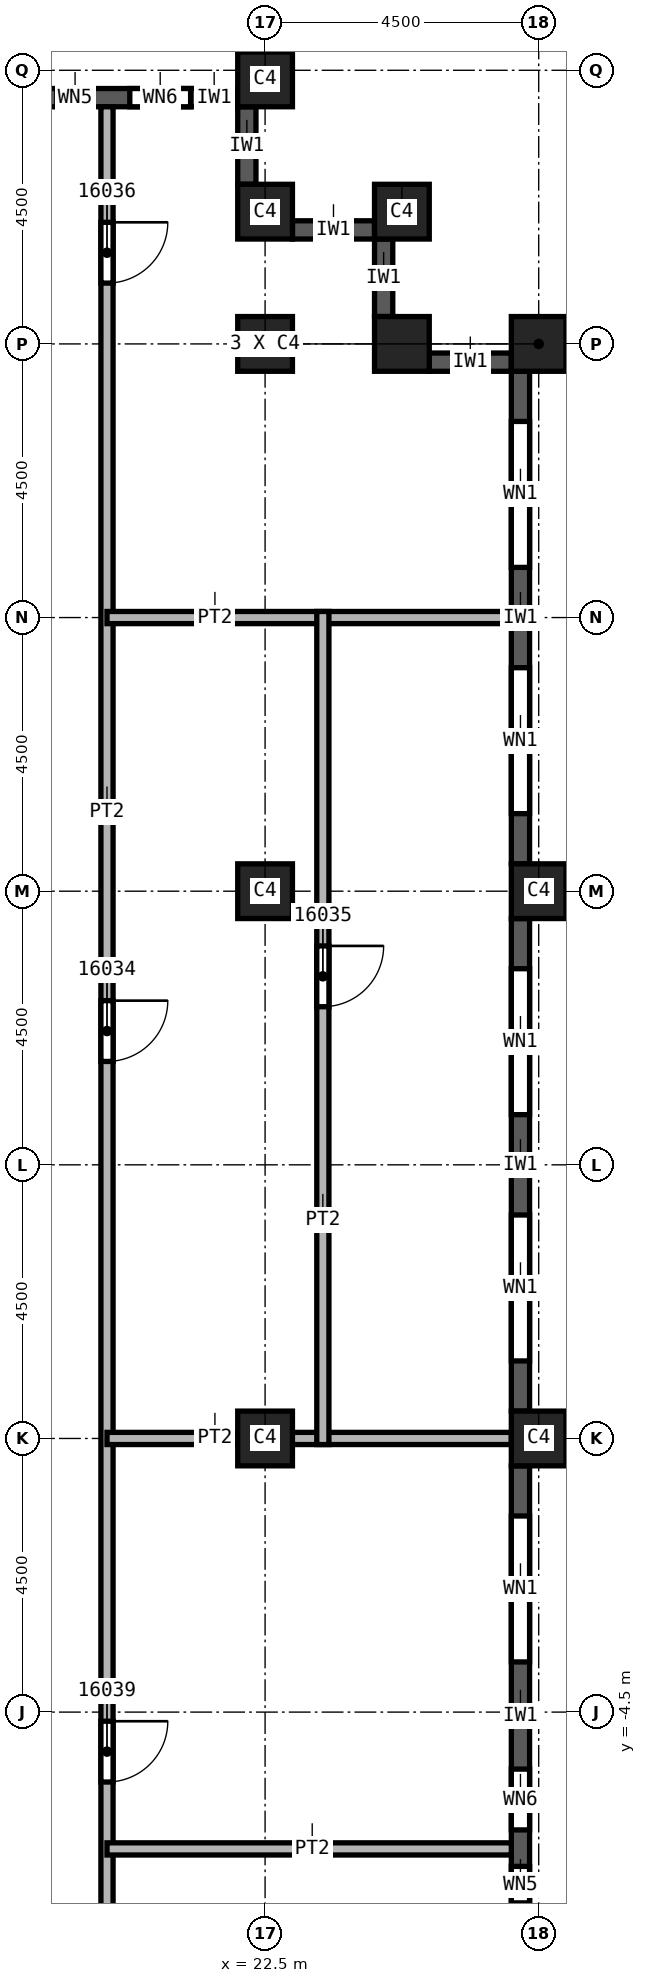
"""IFC4 building model, lengths in metres.
Left out: names, types, materials, properties, quantities, classifications, styles, units other than length and angle.
Written with IfcOpenShell. Run it as: python <this file> out.ifc"""

import sys

from ifc_helpers import new_model, si_unit, direction, frame, frame_2d, origin, origin_2d, place, context, subcontext, project, spatial, rectangle, extrude, element, fill, save


model = new_model("IFC4")
c1 = context("Model", 3, precision=1e-05, world=origin(), true_north=direction((0.0, 1.0)))
c2 = subcontext(c1, "Body", "Model", "MODEL_VIEW")
j1 = project(units=[si_unit("LENGTHUNIT", "METRE"), si_unit("PLANEANGLEUNIT", "RADIAN")], contexts=[c1])
p1 = place(None, origin())
s1 = spatial("IfcSite", under=j1, at=p1, CompositionType="ELEMENT")
p2 = place(p1, origin())
s2 = spatial("IfcBuilding", under=s1, at=p2, CompositionType="ELEMENT")
p3 = place(p2, frame((0.0, 0.0, 246.0)))
s3 = spatial("IfcBuildingStorey", under=s2, at=p3, CompositionType="ELEMENT", Elevation=246.0)
for number, where, z_axis, x_axis in (
    (1, (22.5, 0.0, 0.0), (0.0, 0.0, 1.0), (1.0, 0.0, 0.0)),
    (2, (22.5, 9.0, 0.0), (0.0, 0.0, 1.0), (1.0, 0.0, 0.0)),
    (3, (22.5, 18.0, 0.0), (0.0, 0.0, 1.0), (1.0, 0.0, 0.0)),
    (4, (27.0, 0.0, 0.0), (0.0, 0.0, 1.0), (0.0, 1.0, 0.0)),
    (5, (27.0, 9.0, 0.0), (0.0, 0.0, 1.0), (0.0, 1.0, 0.0)),
    (6, (27.0, 18.0, 0.0), (0.0, 0.0, 1.0), (0.0, 1.0, 0.0)),
    (7, (22.5, 22.35, 0.0), (0.0, 0.0, 1.0), (1.0, 0.0, 0.0)),
    (8, (22.5, 20.175, 0.0), (0.0, 0.0, 1.0), (1.0, 0.0, 0.0)),
    (9, (24.75, 20.175, 0.0), (0.0, 0.0, 1.0), (1.0, 0.0, 0.0)),
    (10, (24.75, 18.0, 0.0), (0.0, 0.0, 1.0), (1.0, 0.0, 0.0)),
):
    element("IfcColumn", number, at=place(p3, frame(where, z_axis=z_axis, x_axis=x_axis)), inside=s3, PredefinedType="COLUMN", context=c2, shape_type="SweptSolid", body=[
        extrude(rectangle(XDim=0.9, YDim=0.9, at=origin_2d()), origin(), (0.0, 0.0, 1.0), 3.72),
    ])
p4 = place(p3, frame((26.7, -8.55, 0.0), z_axis=(0.0, 0.0, 1.0), x_axis=(0.0, 1.0, 0.0)))
e11 = element("IfcWall", 11, at=p4, inside=s3, PredefinedType="SOLIDWALL", context=c2, shape_type="SweptSolid", body=[
    extrude(rectangle(XDim=8.1, YDim=0.3, at=frame_2d((4.05, 0.0))), origin(), (0.0, 0.0, 1.0), 3.12),
])
p5 = place(p4, frame((4.875, 0.0, 0.8)))
e12 = element("IfcOpeningElement", 12, at=p5, cuts=e11, PredefinedType="OPENING", context=c2, shape_type="SweptSolid", body=[
    extrude(rectangle(XDim=2.4, YDim=1.95, at=frame_2d((1.2, 0.975))), frame((0.0, 0.15, 0.0), z_axis=(0.0, -1.0, 0.0), x_axis=(1.0, 0.0, 0.0)), (0.0, 0.0, 1.0), 0.3),
])
p6 = place(p4, frame((0.913, 0.0, 0.8)))
e13 = element("IfcOpeningElement", 13, at=p6, cuts=e11, PredefinedType="OPENING", context=c2, shape_type="SweptSolid", body=[
    extrude(rectangle(XDim=0.6, YDim=1.95, at=frame_2d((0.3, 0.975))), frame((0.0, 0.15, 0.0), z_axis=(0.0, -1.0, 0.0), x_axis=(1.0, 0.0, 0.0)), (0.0, 0.0, 1.0), 0.3),
])
p7 = place(p4, frame((2.113, 0.0, 0.8)))
e14 = element("IfcOpeningElement", 14, at=p7, cuts=e11, PredefinedType="OPENING", context=c2, shape_type="SweptSolid", body=[
    extrude(rectangle(XDim=1.0, YDim=1.95, at=frame_2d((0.5, 0.975))), frame((0.0, 0.15, 0.0), z_axis=(0.0, -1.0, 0.0), x_axis=(1.0, 0.0, 0.0)), (0.0, 0.0, 1.0), 0.3),
])
p8 = place(p3, frame((26.7, 0.45, 0.0), z_axis=(0.0, 0.0, 1.0), x_axis=(0.0, 1.0, 0.0)))
e15 = element("IfcWall", 15, at=p8, inside=s3, PredefinedType="SOLIDWALL", context=c2, shape_type="SweptSolid", body=[
    extrude(rectangle(XDim=8.1, YDim=0.3, at=frame_2d((4.05, 0.0))), origin(), (0.0, 0.0, 1.0), 3.12),
])
p9 = place(p8, frame((0.825, 0.0, 0.8)))
e16 = element("IfcOpeningElement", 16, at=p9, cuts=e15, PredefinedType="OPENING", context=c2, shape_type="SweptSolid", body=[
    extrude(rectangle(XDim=2.4, YDim=1.95, at=frame_2d((1.2, 0.975))), frame((0.0, 0.15, 0.0), z_axis=(0.0, -1.0, 0.0), x_axis=(1.0, 0.0, 0.0)), (0.0, 0.0, 1.0), 0.3),
])
p10 = place(p8, frame((4.875, 0.0, 0.8)))
e17 = element("IfcOpeningElement", 17, at=p10, cuts=e15, PredefinedType="OPENING", context=c2, shape_type="SweptSolid", body=[
    extrude(rectangle(XDim=2.4, YDim=1.95, at=frame_2d((1.2, 0.975))), frame((0.0, 0.15, 0.0), z_axis=(0.0, -1.0, 0.0), x_axis=(1.0, 0.0, 0.0)), (0.0, 0.0, 1.0), 0.3),
])
p11 = place(p3, frame((26.7, 9.45, 0.0), z_axis=(0.0, 0.0, 1.0), x_axis=(0.0, 1.0, 0.0)))
e18 = element("IfcWall", 18, at=p11, inside=s3, PredefinedType="SOLIDWALL", context=c2, shape_type="SweptSolid", body=[
    extrude(rectangle(XDim=8.1, YDim=0.3, at=frame_2d((4.05, 0.0))), origin(), (0.0, 0.0, 1.0), 3.12),
])
p12 = place(p11, frame((0.825, 0.0, 0.8)))
e19 = element("IfcOpeningElement", 19, at=p12, cuts=e18, PredefinedType="OPENING", context=c2, shape_type="SweptSolid", body=[
    extrude(rectangle(XDim=2.4, YDim=1.95, at=frame_2d((1.2, 0.975))), frame((0.0, 0.15, 0.0), z_axis=(0.0, -1.0, 0.0), x_axis=(1.0, 0.0, 0.0)), (0.0, 0.0, 1.0), 0.3),
])
p13 = place(p11, frame((4.875, 0.0, 0.8)))
e20 = element("IfcOpeningElement", 20, at=p13, cuts=e18, PredefinedType="OPENING", context=c2, shape_type="SweptSolid", body=[
    extrude(rectangle(XDim=2.4, YDim=1.95, at=frame_2d((1.2, 0.975))), frame((0.0, 0.15, 0.0), z_axis=(0.0, -1.0, 0.0), x_axis=(1.0, 0.0, 0.0)), (0.0, 0.0, 1.0), 0.3),
])
p14 = place(p3, frame((26.55, 17.7, 0.0), z_axis=(0.0, 0.0, 1.0), x_axis=(-1.0, 0.0, 0.0)))
e21 = element("IfcWall", 21, at=p14, inside=s3, PredefinedType="SOLIDWALL", context=c2, shape_type="SweptSolid", body=[
    extrude(rectangle(XDim=1.35, YDim=0.3, at=frame_2d((0.675, 0.0))), origin(), (0.0, 0.0, 1.0), 3.12),
])
p15 = place(p3, frame((24.45, 18.45, 0.0), z_axis=(0.0, 0.0, 1.0), x_axis=(0.0, 1.0, 0.0)))
e22 = element("IfcWall", 22, at=p15, inside=s3, PredefinedType="SOLIDWALL", context=c2, shape_type="SweptSolid", body=[
    extrude(rectangle(XDim=1.275, YDim=0.3, at=frame_2d((0.638, 0.0))), origin(), (0.0, 0.0, 1.0), 3.12),
])
p16 = place(p3, frame((24.3, 19.875, 0.0), z_axis=(0.0, 0.0, 1.0), x_axis=(-1.0, 0.0, 0.0)))
e23 = element("IfcWall", 23, at=p16, inside=s3, PredefinedType="SOLIDWALL", context=c2, shape_type="SweptSolid", body=[
    extrude(rectangle(XDim=1.35, YDim=0.3, at=frame_2d((0.675, 0.0))), origin(), (0.0, 0.0, 1.0), 3.12),
])
p17 = place(p3, frame((22.2, 20.625, 0.0), z_axis=(0.0, 0.0, 1.0), x_axis=(0.0, 1.0, 0.0)))
e24 = element("IfcWall", 24, at=p17, inside=s3, PredefinedType="SOLIDWALL", context=c2, shape_type="SweptSolid", body=[
    extrude(rectangle(XDim=1.275, YDim=0.3, at=frame_2d((0.637, 0.0))), origin(), (0.0, 0.0, 1.0), 3.12),
])
p18 = place(p3, frame((22.05, 22.05, 0.0), z_axis=(0.0, 0.0, 1.0), x_axis=(-1.0, 0.0, 0.0)))
e25 = element("IfcWall", 25, at=p18, inside=s3, PredefinedType="SOLIDWALL", context=c2, shape_type="SweptSolid", body=[
    extrude(rectangle(XDim=3.6, YDim=0.3, at=frame_2d((1.8, 0.0))), origin(), (0.0, 0.0, 1.0), 3.12),
])
p19 = place(p18, frame((0.775, 0.0, 0.8)))
e26 = element("IfcOpeningElement", 26, at=p19, cuts=e25, PredefinedType="OPENING", context=c2, shape_type="SweptSolid", body=[
    extrude(rectangle(XDim=1.0, YDim=1.95, at=frame_2d((0.5, 0.975))), frame((0.0, 0.15, 0.0), z_axis=(0.0, -1.0, 0.0), x_axis=(1.0, 0.0, 0.0)), (0.0, 0.0, 1.0), 0.3),
])
p20 = place(p18, frame((2.375, 0.0, 0.8)))
e27 = element("IfcOpeningElement", 27, at=p20, cuts=e25, PredefinedType="OPENING", context=c2, shape_type="SweptSolid", body=[
    extrude(rectangle(XDim=0.6, YDim=1.95, at=frame_2d((0.3, 0.975))), frame((0.0, 0.15, 0.0), z_axis=(0.0, -1.0, 0.0), x_axis=(1.0, 0.0, 0.0)), (0.0, 0.0, 1.0), 0.3),
])
p21 = place(p3, frame((19.9, 21.9, 0.0), z_axis=(0.0, 0.0, 1.0), x_axis=(0.0, -1.0, 0.0)))
e28 = element("IfcWall", 28, at=p21, inside=s3, PredefinedType="PARTITIONING", context=c2, shape_type="SweptSolid", body=[
    extrude(rectangle(XDim=43.8, YDim=0.2, at=frame_2d((21.9, 0.0))), origin(), (0.0, 0.0, 1.0), 3.72),
])
p22 = place(p21, frame((14.7, 0.0, 0.0)))
e29 = element("IfcOpeningElement", 29, at=p22, cuts=e28, PredefinedType="OPENING", context=c2, shape_type="SweptSolid", body=[
    extrude(rectangle(XDim=1.0, YDim=2.1, at=frame_2d((0.5, 1.05))), frame((0.0, 0.1, 0.0), z_axis=(0.0, -1.0, 0.0), x_axis=(1.0, 0.0, 0.0)), (0.0, 0.0, 1.0), 0.2),
])
p23 = place(p21, frame((1.9, 0.0, 0.0)))
e30 = element("IfcOpeningElement", 30, at=p23, cuts=e28, PredefinedType="OPENING", context=c2, shape_type="SweptSolid", body=[
    extrude(rectangle(XDim=1.0, YDim=2.1, at=frame_2d((0.5, 1.05))), frame((0.0, 0.1, 0.0), z_axis=(0.0, -1.0, 0.0), x_axis=(1.0, 0.0, 0.0)), (0.0, 0.0, 1.0), 0.2),
])
p24 = place(p21, frame((36.3, 0.0, 0.0)))
e31 = element("IfcOpeningElement", 31, at=p24, cuts=e28, PredefinedType="OPENING", context=c2, shape_type="SweptSolid", body=[
    extrude(rectangle(XDim=1.0, YDim=2.1, at=frame_2d((0.5, 1.05))), frame((0.0, 0.1, 0.0), z_axis=(0.0, -1.0, 0.0), x_axis=(1.0, 0.0, 0.0)), (0.0, 0.0, 1.0), 0.2),
])
p25 = place(p21, frame((34.2, 0.0, 0.0)))
e32 = element("IfcOpeningElement", 32, at=p25, cuts=e28, PredefinedType="OPENING", context=c2, shape_type="SweptSolid", body=[
    extrude(rectangle(XDim=1.0, YDim=2.1, at=frame_2d((0.5, 1.05))), frame((0.0, 0.1, 0.0), z_axis=(0.0, -1.0, 0.0), x_axis=(1.0, 0.0, 0.0)), (0.0, 0.0, 1.0), 0.2),
])
p26 = place(p21, frame((26.55, 0.0, 0.0)))
e33 = element("IfcOpeningElement", 33, at=p26, cuts=e28, PredefinedType="OPENING", context=c2, shape_type="SweptSolid", body=[
    extrude(rectangle(XDim=1.0, YDim=2.1, at=frame_2d((0.5, 1.05))), frame((0.0, 0.1, 0.0), z_axis=(0.0, -1.0, 0.0), x_axis=(1.0, 0.0, 0.0)), (0.0, 0.0, 1.0), 0.2),
])
for number, where, z_axis, x_axis in (
    (34, (19.9, -6.75, 0.0), (0.0, 0.0, 1.0), (1.0, 0.0, 0.0)),
    (35, (19.9, 13.5, 0.0), (0.0, 0.0, 1.0), (1.0, 0.0, 0.0)),
    (36, (26.55, 0.0, 0.0), (0.0, 0.0, 1.0), (-1.0, 0.0, 0.0)),
):
    element("IfcWall", number, at=place(p3, frame(where, z_axis=z_axis, x_axis=x_axis)), inside=s3, PredefinedType="PARTITIONING", context=c2, shape_type="SweptSolid", body=[
        extrude(rectangle(XDim=6.65, YDim=0.2, at=frame_2d((3.325, 0.0))), origin(), (0.0, 0.0, 1.0), 3.72),
    ])
p27 = place(p3, frame((23.45, 13.6, 0.0), z_axis=(0.0, 0.0, 1.0), x_axis=(0.0, -1.0, 0.0)))
e37 = element("IfcWall", 37, at=p27, inside=s3, PredefinedType="PARTITIONING", context=c2, shape_type="SweptSolid", body=[
    extrude(rectangle(XDim=13.7, YDim=0.2, at=frame_2d((6.85, 0.0))), origin(), (0.0, 0.0, 1.0), 3.72),
])
p28 = place(p27, frame((5.5, 0.0, 0.0)))
e38 = element("IfcOpeningElement", 38, at=p28, cuts=e37, PredefinedType="OPENING", context=c2, shape_type="SweptSolid", body=[
    extrude(rectangle(XDim=1.0, YDim=2.1, at=frame_2d((0.5, 1.05))), frame((0.0, 0.1, 0.0), z_axis=(0.0, -1.0, 0.0), x_axis=(1.0, 0.0, 0.0)), (0.0, 0.0, 1.0), 0.2),
])
p29 = place(p5, origin())
e39 = element("IfcWindow", 39, at=p29, inside=s3, PartitioningType="SINGLE_PANEL", PredefinedType="WINDOW", context=c2, shape_type="SweptSolid", body=[
    extrude(rectangle(XDim=2.4, YDim=1.95, at=frame_2d((1.2, 0.975))), frame((0.0, 0.03, 0.0), z_axis=(0.0, -1.0, 0.0), x_axis=(1.0, 0.0, 0.0)), (0.0, 0.0, 1.0), 0.06),
])
fill(e12, e39)
p30 = place(p9, origin())
e40 = element("IfcWindow", 40, at=p30, inside=s3, PartitioningType="SINGLE_PANEL", PredefinedType="WINDOW", context=c2, shape_type="SweptSolid", body=[
    extrude(rectangle(XDim=2.4, YDim=1.95, at=frame_2d((1.2, 0.975))), frame((0.0, 0.03, 0.0), z_axis=(0.0, -1.0, 0.0), x_axis=(1.0, 0.0, 0.0)), (0.0, 0.0, 1.0), 0.06),
])
fill(e16, e40)
p31 = place(p10, origin())
e41 = element("IfcWindow", 41, at=p31, inside=s3, PartitioningType="SINGLE_PANEL", PredefinedType="WINDOW", context=c2, shape_type="SweptSolid", body=[
    extrude(rectangle(XDim=2.4, YDim=1.95, at=frame_2d((1.2, 0.975))), frame((0.0, 0.03, 0.0), z_axis=(0.0, -1.0, 0.0), x_axis=(1.0, 0.0, 0.0)), (0.0, 0.0, 1.0), 0.06),
])
fill(e17, e41)
p32 = place(p12, origin())
e42 = element("IfcWindow", 42, at=p32, inside=s3, PartitioningType="SINGLE_PANEL", PredefinedType="WINDOW", context=c2, shape_type="SweptSolid", body=[
    extrude(rectangle(XDim=2.4, YDim=1.95, at=frame_2d((1.2, 0.975))), frame((0.0, 0.03, 0.0), z_axis=(0.0, -1.0, 0.0), x_axis=(1.0, 0.0, 0.0)), (0.0, 0.0, 1.0), 0.06),
])
fill(e19, e42)
p33 = place(p13, origin())
e43 = element("IfcWindow", 43, at=p33, inside=s3, PartitioningType="SINGLE_PANEL", PredefinedType="WINDOW", context=c2, shape_type="SweptSolid", body=[
    extrude(rectangle(XDim=2.4, YDim=1.95, at=frame_2d((1.2, 0.975))), frame((0.0, 0.03, 0.0), z_axis=(0.0, -1.0, 0.0), x_axis=(1.0, 0.0, 0.0)), (0.0, 0.0, 1.0), 0.06),
])
fill(e20, e43)
p34 = place(p22, origin())
e44 = element("IfcDoor", 44, at=p34, inside=s3, OperationType="SINGLE_SWING_LEFT", PredefinedType="DOOR", context=c2, shape_type="SweptSolid", body=[
    extrude(rectangle(XDim=1.0, YDim=2.1, at=frame_2d((0.5, 1.05))), frame((0.0, 0.025, 0.0), z_axis=(0.0, -1.0, 0.0), x_axis=(1.0, 0.0, 0.0)), (0.0, 0.0, 1.0), 0.05),
])
fill(e29, e44)
p35 = place(p28, origin())
e45 = element("IfcDoor", 45, at=p35, inside=s3, OperationType="SINGLE_SWING_RIGHT", PredefinedType="DOOR", context=c2, shape_type="SweptSolid", body=[
    extrude(rectangle(XDim=1.0, YDim=2.1, at=frame_2d((0.5, 1.05))), frame((0.0, 0.025, 0.0), z_axis=(0.0, -1.0, 0.0), x_axis=(1.0, 0.0, 0.0)), (0.0, 0.0, 1.0), 0.05),
])
fill(e38, e45)
p36 = place(p23, origin())
e46 = element("IfcDoor", 46, at=p36, inside=s3, OperationType="SINGLE_SWING_LEFT", PredefinedType="DOOR", context=c2, shape_type="SweptSolid", body=[
    extrude(rectangle(XDim=1.0, YDim=2.1, at=frame_2d((0.5, 1.05))), frame((0.0, 0.025, 0.0), z_axis=(0.0, -1.0, 0.0), x_axis=(1.0, 0.0, 0.0)), (0.0, 0.0, 1.0), 0.05),
])
fill(e30, e46)
p37 = place(p26, origin())
e47 = element("IfcDoor", 47, at=p37, inside=s3, OperationType="SINGLE_SWING_RIGHT", PredefinedType="DOOR", context=c2, shape_type="SweptSolid", body=[
    extrude(rectangle(XDim=1.0, YDim=2.1, at=frame_2d((0.5, 1.05))), frame((0.0, 0.025, 0.0), z_axis=(0.0, -1.0, 0.0), x_axis=(1.0, 0.0, 0.0)), (0.0, 0.0, 1.0), 0.05),
])
fill(e33, e47)
p38 = place(p6, origin())
e48 = element("IfcWindow", 48, at=p38, inside=s3, PartitioningType="SINGLE_PANEL", PredefinedType="WINDOW", context=c2, shape_type="SweptSolid", body=[
    extrude(rectangle(XDim=0.6, YDim=1.95, at=frame_2d((0.3, 0.975))), frame((0.0, 0.03, 0.0), z_axis=(0.0, -1.0, 0.0), x_axis=(1.0, 0.0, 0.0)), (0.0, 0.0, 1.0), 0.06),
])
fill(e13, e48)
p39 = place(p7, origin())
e49 = element("IfcWindow", 49, at=p39, inside=s3, PartitioningType="SINGLE_PANEL", PredefinedType="WINDOW", context=c2, shape_type="SweptSolid", body=[
    extrude(rectangle(XDim=1.0, YDim=1.95, at=frame_2d((0.5, 0.975))), frame((0.0, 0.03, 0.0), z_axis=(0.0, -1.0, 0.0), x_axis=(1.0, 0.0, 0.0)), (0.0, 0.0, 1.0), 0.06),
])
fill(e14, e49)
p40 = place(p19, origin())
e50 = element("IfcWindow", 50, at=p40, inside=s3, PartitioningType="SINGLE_PANEL", PredefinedType="WINDOW", context=c2, shape_type="SweptSolid", body=[
    extrude(rectangle(XDim=1.0, YDim=1.95, at=frame_2d((0.5, 0.975))), frame((0.0, 0.03, 0.0), z_axis=(0.0, -1.0, 0.0), x_axis=(1.0, 0.0, 0.0)), (0.0, 0.0, 1.0), 0.06),
])
fill(e26, e50)
p41 = place(p20, origin())
e51 = element("IfcWindow", 51, at=p41, inside=s3, PartitioningType="SINGLE_PANEL", PredefinedType="WINDOW", context=c2, shape_type="SweptSolid", body=[
    extrude(rectangle(XDim=0.6, YDim=1.95, at=frame_2d((0.3, 0.975))), frame((0.0, 0.03, 0.0), z_axis=(0.0, -1.0, 0.0), x_axis=(1.0, 0.0, 0.0)), (0.0, 0.0, 1.0), 0.06),
])
fill(e27, e51)
save(model, sys.argv[1])
